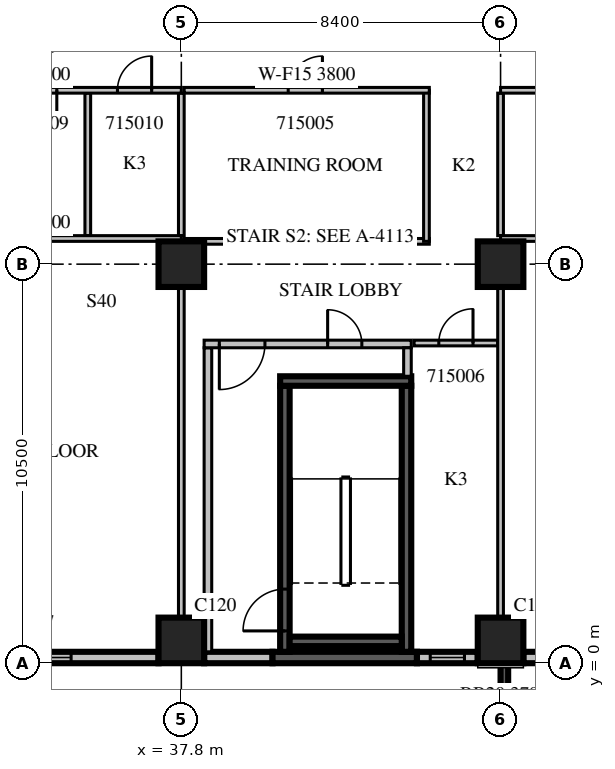
"""IFC4 building model, lengths in metres.
Left out: names, types, materials, properties, quantities, classifications, styles, units other than length and angle.
Written with IfcOpenShell. Run it as: python <this file> out.ifc"""

import sys

from ifc_helpers import new_model, si_unit, direction, frame, frame_2d, origin, origin_2d, place, context, subcontext, project, spatial, rectangle, extrude, source, transform, mapped, element, fill, save


model = new_model("IFC4")
c1 = context("Model", 3, precision=1e-05, world=origin(), true_north=direction((0.0, 1.0)))
c2 = subcontext(c1, "Body", "Model", "MODEL_VIEW")
j1 = project(units=[si_unit("LENGTHUNIT", "METRE"), si_unit("PLANEANGLEUNIT", "RADIAN")], contexts=[c1])
p1 = place(None, origin())
s1 = spatial("IfcSite", under=j1, at=p1, CompositionType="ELEMENT")
p2 = place(p1, origin())
s2 = spatial("IfcBuilding", under=s1, at=p2, CompositionType="ELEMENT")
p3 = place(p2, frame((0.0, 0.0, 74.1)))
s3 = spatial("IfcBuildingStorey", under=s2, at=p3, CompositionType="ELEMENT", Elevation=74.1)
m1 = source(origin(), c2, "Body", "SweptSolid", [
    extrude(rectangle(XDim=1.2, YDim=1.2, at=origin_2d()), origin(), (0.0, 0.0, 1.0), 4.2),
])
for number, where, z_axis, x_axis in (
    (1, (37.8, 0.6, 0.0), (0.0, 0.0, 1.0), (1.0, 0.0, 0.0)),
    (2, (46.2, 0.6, 0.0), (0.0, 0.0, 1.0), (1.0, 0.0, 0.0)),
    (3, (37.8, 10.5, 0.0), (0.0, 0.0, 1.0), (1.0, 0.0, 0.0)),
    (4, (46.2, 10.5, 0.0), (0.0, 0.0, 1.0), (1.0, 0.0, 0.0)),
):
    element("IfcColumn", number, at=place(p3, frame(where, z_axis=z_axis, x_axis=x_axis)), inside=s3, PredefinedType="COLUMN", context=c2, shape_type="MappedRepresentation", body=[
        mapped(m1, transform((0.0, 0.0, 0.0), scale=1.0)),
    ])
m2 = source(origin(), c2, "Body", "SweptSolid", [
    extrude(rectangle(XDim=7.2, YDim=0.3, at=frame_2d((3.6, 0.0))), origin(), (0.0, 0.0, 1.0), 3.8),
])
p4 = place(p3, frame((30.0, 0.15, 0.0), z_axis=(0.0, 0.0, 1.0), x_axis=(1.0, 0.0, 0.0)))
e5 = element("IfcWall", 5, at=p4, inside=s3, PredefinedType="STANDARD", context=c2, shape_type="MappedRepresentation", body=[
    mapped(m2, transform((0.0, 0.0, 0.0), scale=1.0)),
])
m3 = source(origin(), c2, "Body", "SweptSolid", [
    extrude(rectangle(XDim=2.4, YDim=2.7, at=frame_2d((1.2, 1.35))), frame((0.0, 0.16, 0.0), z_axis=(0.0, -1.0, 0.0), x_axis=(1.0, 0.0, 0.0)), (0.0, 0.0, 1.0), 0.32),
])
p5 = place(p4, frame((2.5, 0.0, 0.6)))
e6 = element("IfcOpeningElement", 6, at=p5, cuts=e5, PredefinedType="OPENING", context=c2, shape_type="MappedRepresentation", body=[
    mapped(m3, transform((0.0, 0.0, 0.0), scale=1.0)),
])
m4 = source(origin(), c2, "Body", "SweptSolid", [
    extrude(rectangle(XDim=1.8, YDim=0.3, at=frame_2d((0.9, 0.0))), origin(), (0.0, 0.0, 1.0), 3.8),
])
p6 = place(p3, frame((38.4, 0.15, 0.0), z_axis=(0.0, 0.0, 1.0), x_axis=(1.0, 0.0, 0.0)))
e7 = element("IfcWall", 7, at=p6, inside=s3, PredefinedType="STANDARD", context=c2, shape_type="MappedRepresentation", body=[
    mapped(m4, transform((0.0, 0.0, 0.0), scale=1.0)),
])
m5 = source(origin(), c2, "Body", "SweptSolid", [
    extrude(rectangle(XDim=3.8, YDim=0.3, at=frame_2d((1.9, 0.0))), origin(), (0.0, 0.0, 1.0), 3.8),
])
p7 = place(p3, frame((40.2, 0.15, 0.0), z_axis=(0.0, 0.0, 1.0), x_axis=(1.0, 0.0, 0.0)))
e8 = element("IfcWall", 8, at=p7, inside=s3, PredefinedType="SOLIDWALL", context=c2, shape_type="MappedRepresentation", body=[
    mapped(m5, transform((0.0, 0.0, 0.0), scale=1.0)),
])
m6 = source(origin(), c2, "Body", "SweptSolid", [
    extrude(rectangle(XDim=1.6, YDim=0.3, at=frame_2d((0.8, 0.0))), origin(), (0.0, 0.0, 1.0), 3.8),
])
p8 = place(p3, frame((44.0, 0.15, 0.0), z_axis=(0.0, 0.0, 1.0), x_axis=(1.0, 0.0, 0.0)))
e9 = element("IfcWall", 9, at=p8, inside=s3, PredefinedType="STANDARD", context=c2, shape_type="MappedRepresentation", body=[
    mapped(m6, transform((0.0, 0.0, 0.0), scale=1.0)),
])
m7 = source(origin(), c2, "Body", "SweptSolid", [
    extrude(rectangle(XDim=0.9, YDim=2.7, at=frame_2d((0.45, 1.35))), frame((0.0, 0.16, 0.0), z_axis=(0.0, -1.0, 0.0), x_axis=(1.0, 0.0, 0.0)), (0.0, 0.0, 1.0), 0.32),
])
p9 = place(p8, frame((0.35, 0.0, 0.6)))
e10 = element("IfcOpeningElement", 10, at=p9, cuts=e9, PredefinedType="OPENING", context=c2, shape_type="MappedRepresentation", body=[
    mapped(m7, transform((0.0, 0.0, 0.0), scale=1.0)),
])
m8 = source(origin(), c2, "Body", "SweptSolid", [
    extrude(rectangle(XDim=4.68, YDim=0.3, at=frame_2d((2.34, 0.0))), origin(), (0.0, 0.0, 1.0), 3.8),
])
p10 = place(p3, frame((46.8, 0.15, 0.0), z_axis=(0.0, 0.0, 1.0), x_axis=(1.0, 0.0, 0.0)))
e11 = element("IfcWall", 11, at=p10, inside=s3, PredefinedType="STANDARD", context=c2, shape_type="MappedRepresentation", body=[
    mapped(m8, transform((0.0, 0.0, 0.0), scale=1.0)),
])
m9 = source(origin(), c2, "Body", "SweptSolid", [
    extrude(rectangle(XDim=1.0, YDim=2.1, at=frame_2d((0.5, 1.05))), frame((0.0, 0.16, 0.0), z_axis=(0.0, -1.0, 0.0), x_axis=(1.0, 0.0, 0.0)), (0.0, 0.0, 1.0), 0.32),
])
p11 = place(p10, frame((1.84, 0.0, 0.0)))
e12 = element("IfcOpeningElement", 12, at=p11, cuts=e11, PredefinedType="OPENING", context=c2, shape_type="MappedRepresentation", body=[
    mapped(m9, transform((0.0, 0.0, 0.0), scale=1.0)),
])
m10 = source(origin(), c2, "Body", "SweptSolid", [
    extrude(rectangle(XDim=3.9, YDim=0.2, at=frame_2d((1.95, 0.0))), origin(), (0.0, 0.0, 1.0), 3.79),
])
p12 = place(p3, frame((46.3, 0.0, 0.0), z_axis=(0.0, 0.0, 1.0), x_axis=(0.0, -1.0, 0.0)))
e13 = element("IfcWall", 13, at=p12, inside=s3, PredefinedType="SOLIDWALL", context=c2, shape_type="MappedRepresentation", body=[
    mapped(m10, transform((0.0, 0.0, 0.0), scale=1.0)),
])
m11 = source(origin(), c2, "Body", "SweptSolid", [
    extrude(rectangle(XDim=2.4, YDim=2.7, at=frame_2d((1.2, 1.35))), frame((0.0, 0.11, 0.0), z_axis=(0.0, -1.0, 0.0), x_axis=(1.0, 0.0, 0.0)), (0.0, 0.0, 1.0), 0.22),
])
p13 = place(p12, frame((0.75, 0.0, 0.6)))
e14 = element("IfcOpeningElement", 14, at=p13, cuts=e13, PredefinedType="OPENING", context=c2, shape_type="MappedRepresentation", body=[
    mapped(m11, transform((0.0, 0.0, 0.0), scale=1.0)),
])
m12 = source(origin(), c2, "Body", "SweptSolid", [
    extrude(rectangle(XDim=7.0, YDim=0.25, at=frame_2d((3.5, 0.0))), origin(), (0.0, 0.0, 1.0), 3.8),
])
p14 = place(p3, frame((40.525, 0.3, 0.0), z_axis=(0.0, 0.0, 1.0), x_axis=(0.0, 1.0, 0.0)))
e15 = element("IfcWall", 15, at=p14, inside=s3, PredefinedType="SOLIDWALL", context=c2, shape_type="MappedRepresentation", body=[
    mapped(m12, transform((0.0, 0.0, 0.0), scale=1.0)),
])
m13 = source(origin(), c2, "Body", "SweptSolid", [
    extrude(rectangle(XDim=1.1, YDim=2.1, at=frame_2d((0.55, 1.05))), frame((0.0, 0.135, 0.0), z_axis=(0.0, -1.0, 0.0), x_axis=(1.0, 0.0, 0.0)), (0.0, 0.0, 1.0), 0.27),
])
p15 = place(p14, frame((0.55, 0.0, 0.0)))
e16 = element("IfcOpeningElement", 16, at=p15, cuts=e15, PredefinedType="OPENING", context=c2, shape_type="MappedRepresentation", body=[
    mapped(m13, transform((0.0, 0.0, 0.0), scale=1.0)),
])
p16 = place(p3, frame((43.725, 0.3, 0.0), z_axis=(0.0, 0.0, 1.0), x_axis=(0.0, 1.0, 0.0)))
e17 = element("IfcWall", 17, at=p16, inside=s3, PredefinedType="SOLIDWALL", context=c2, shape_type="MappedRepresentation", body=[
    mapped(m12, transform((0.0, 0.0, 0.0), scale=1.0)),
])
m14 = source(origin(), c2, "Body", "SweptSolid", [
    extrude(rectangle(XDim=3.45, YDim=0.25, at=frame_2d((1.725, 0.0))), origin(), (0.0, 0.0, 1.0), 3.8),
])
p17 = place(p3, frame((40.4, 7.425, 0.0), z_axis=(0.0, 0.0, 1.0), x_axis=(1.0, 0.0, 0.0)))
e18 = element("IfcWall", 18, at=p17, inside=s3, PredefinedType="SOLIDWALL", context=c2, shape_type="MappedRepresentation", body=[
    mapped(m14, transform((0.0, 0.0, 0.0), scale=1.0)),
])
m15 = source(origin(), c2, "Body", "SweptSolid", [
    extrude(rectangle(XDim=2.95, YDim=0.25, at=frame_2d((1.475, 0.0))), origin(), (0.0, 0.0, 1.0), 3.8),
])
p18 = place(p3, frame((40.65, 0.575, 0.0), z_axis=(0.0, 0.0, 1.0), x_axis=(1.0, 0.0, 0.0)))
e19 = element("IfcWall", 19, at=p18, inside=s3, PredefinedType="SOLIDWALL", context=c2, shape_type="MappedRepresentation", body=[
    mapped(m15, transform((0.0, 0.0, 0.0), scale=1.0)),
])
m16 = source(origin(), c2, "Body", "SweptSolid", [
    extrude(rectangle(XDim=8.0, YDim=0.2, at=frame_2d((4.0, 0.0))), origin(), (0.0, 0.0, 1.0), 3.8),
])
p19 = place(p3, frame((38.5, 0.3, 0.0), z_axis=(0.0, 0.0, 1.0), x_axis=(0.0, 1.0, 0.0)))
e20 = element("IfcWall", 20, at=p19, inside=s3, PredefinedType="PARTITIONING", context=c2, shape_type="MappedRepresentation", body=[
    mapped(m16, transform((0.0, 0.0, 0.0), scale=1.0)),
])
m17 = source(origin(), c2, "Body", "SweptSolid", [
    extrude(rectangle(XDim=5.45, YDim=0.2, at=frame_2d((2.725, 0.0))), origin(), (0.0, 0.0, 1.0), 3.8),
])
p20 = place(p3, frame((38.4, 8.4, 0.0), z_axis=(0.0, 0.0, 1.0), x_axis=(1.0, 0.0, 0.0)))
e21 = element("IfcWall", 21, at=p20, inside=s3, PredefinedType="PARTITIONING", context=c2, shape_type="MappedRepresentation", body=[
    mapped(m17, transform((0.0, 0.0, 0.0), scale=1.0)),
])
m18 = source(origin(), c2, "Body", "SweptSolid", [
    extrude(rectangle(XDim=1.2, YDim=2.1, at=frame_2d((0.6, 1.05))), frame((0.0, 0.11, 0.0), z_axis=(0.0, -1.0, 0.0), x_axis=(1.0, 0.0, 0.0)), (0.0, 0.0, 1.0), 0.22),
])
p21 = place(p20, frame((0.4, 0.0, 0.0)))
e22 = element("IfcOpeningElement", 22, at=p21, cuts=e21, PredefinedType="OPENING", context=c2, shape_type="MappedRepresentation", body=[
    mapped(m18, transform((0.0, 0.0, 0.0), scale=1.0)),
])
m19 = source(origin(), c2, "Body", "SweptSolid", [
    extrude(rectangle(XDim=0.9, YDim=2.1, at=frame_2d((0.45, 1.05))), frame((0.0, 0.11, 0.0), z_axis=(0.0, -1.0, 0.0), x_axis=(1.0, 0.0, 0.0)), (0.0, 0.0, 1.0), 0.22),
])
p22 = place(p20, frame((3.25, 0.0, 0.0)))
e23 = element("IfcOpeningElement", 23, at=p22, cuts=e21, PredefinedType="OPENING", context=c2, shape_type="MappedRepresentation", body=[
    mapped(m19, transform((0.0, 0.0, 0.0), scale=1.0)),
])
m20 = source(origin(), c2, "Body", "SweptSolid", [
    extrude(rectangle(XDim=0.75, YDim=0.2, at=frame_2d((0.375, 0.0))), origin(), (0.0, 0.0, 1.0), 3.8),
])
p23 = place(p3, frame((43.75, 7.55, 0.0), z_axis=(0.0, 0.0, 1.0), x_axis=(0.0, 1.0, 0.0)))
e24 = element("IfcWall", 24, at=p23, inside=s3, PredefinedType="PARTITIONING", context=c2, shape_type="MappedRepresentation", body=[
    mapped(m20, transform((0.0, 0.0, 0.0), scale=1.0)),
])
m21 = source(origin(), c2, "Body", "SweptSolid", [
    extrude(rectangle(XDim=6.45, YDim=0.15, at=frame_2d((3.225, 0.0))), origin(), (0.0, 0.0, 1.0), 3.8),
])
p24 = place(p3, frame((37.875, 11.1, 0.0), z_axis=(0.0, 0.0, 1.0), x_axis=(1.0, 0.0, 0.0)))
e25 = element("IfcWall", 25, at=p24, inside=s3, PredefinedType="PARTITIONING", context=c2, shape_type="MappedRepresentation", body=[
    mapped(m21, transform((0.0, 0.0, 0.0), scale=1.0)),
])
m22 = source(origin(), c2, "Body", "SweptSolid", [
    extrude(rectangle(XDim=3.975, YDim=0.15, at=frame_2d((1.988, 0.0))), origin(), (0.0, 0.0, 1.0), 3.8),
])
p25 = place(p3, frame((44.25, 11.1, 0.0), z_axis=(0.0, 0.0, 1.0), x_axis=(0.0, 1.0, 0.0)))
e26 = element("IfcWall", 26, at=p25, inside=s3, PredefinedType="PARTITIONING", context=c2, shape_type="MappedRepresentation", body=[
    mapped(m22, transform((0.0, 0.0, 0.0), scale=1.0)),
])
p26 = place(p3, frame((44.325, 15.075, 0.0), z_axis=(0.0, 0.0, 1.0), x_axis=(-1.0, 0.0, 0.0)))
e27 = element("IfcWall", 27, at=p26, inside=s3, PredefinedType="PARTITIONING", context=c2, shape_type="MappedRepresentation", body=[
    mapped(m21, transform((0.0, 0.0, 0.0), scale=1.0)),
])
m23 = source(origin(), c2, "Body", "SweptSolid", [
    extrude(rectangle(XDim=0.9, YDim=2.1, at=frame_2d((0.45, 1.05))), frame((0.0, 0.085, 0.0), z_axis=(0.0, -1.0, 0.0), x_axis=(1.0, 0.0, 0.0)), (0.0, 0.0, 1.0), 0.17),
])
p27 = place(p26, frame((2.812, 0.0, 0.0)))
e28 = element("IfcOpeningElement", 28, at=p27, cuts=e27, PredefinedType="OPENING", context=c2, shape_type="MappedRepresentation", body=[
    mapped(m23, transform((0.0, 0.0, 0.0), scale=1.0)),
])
m24 = source(origin(), c2, "Body", "SweptSolid", [
    extrude(rectangle(XDim=2.2, YDim=0.15, at=frame_2d((1.1, 0.0))), origin(), (0.0, 0.0, 1.0), 3.8),
])
p28 = place(p3, frame((46.125, 8.425, 0.0), z_axis=(0.0, 0.0, 1.0), x_axis=(-1.0, 0.0, 0.0)))
e29 = element("IfcWall", 29, at=p28, inside=s3, PredefinedType="PARTITIONING", context=c2, shape_type="MappedRepresentation", body=[
    mapped(m24, transform((0.0, 0.0, 0.0), scale=1.0)),
])
p29 = place(p28, frame((0.65, 0.0, 0.0)))
e30 = element("IfcOpeningElement", 30, at=p29, cuts=e29, PredefinedType="OPENING", context=c2, shape_type="MappedRepresentation", body=[
    mapped(m23, transform((0.0, 0.0, 0.0), scale=1.0)),
])
m25 = source(origin(), c2, "Body", "SweptSolid", [
    extrude(rectangle(XDim=3.75, YDim=0.15, at=frame_2d((1.875, 0.0))), origin(), (0.0, 0.0, 1.0), 3.8),
])
p30 = place(p3, frame((35.339, 11.25, 0.0), z_axis=(0.0, 0.0, 1.0), x_axis=(0.0, 1.0, 0.0)))
e31 = element("IfcWall", 31, at=p30, inside=s3, PredefinedType="PARTITIONING", context=c2, shape_type="MappedRepresentation", body=[
    mapped(m25, transform((0.0, 0.0, 0.0), scale=1.0)),
])
m26 = source(origin(), c2, "Body", "SweptSolid", [
    extrude(rectangle(XDim=8.702, YDim=0.15, at=frame_2d((4.351, 0.0))), origin(), (0.0, 0.0, 1.0), 3.8),
])
p31 = place(p3, frame((37.8, 1.199, 0.0), z_axis=(0.0, 0.0, 1.0), x_axis=(0.0, 1.0, 0.0)))
e32 = element("IfcWall", 32, at=p31, inside=s3, PredefinedType="PARTITIONING", context=c2, shape_type="MappedRepresentation", body=[
    mapped(m26, transform((0.0, 0.0, 0.0), scale=1.0)),
])
p32 = place(p3, frame((37.8, 11.25, 0.0), z_axis=(0.0, 0.0, 1.0), x_axis=(0.0, 1.0, 0.0)))
e33 = element("IfcWall", 33, at=p32, inside=s3, PredefinedType="PARTITIONING", context=c2, shape_type="MappedRepresentation", body=[
    mapped(m25, transform((0.0, 0.0, 0.0), scale=1.0)),
])
m27 = source(origin(), c2, "Body", "SweptSolid", [
    extrude(rectangle(XDim=8.4, YDim=0.15, at=frame_2d((4.2, 0.0))), origin(), (0.0, 0.0, 1.0), 3.3),
])
p33 = place(p3, frame((37.8, 11.175, 0.0), z_axis=(0.0, 0.0, 1.0), x_axis=(-1.0, 0.0, 0.0)))
e34 = element("IfcWall", 34, at=p33, inside=s3, PredefinedType="PARTITIONING", context=c2, shape_type="MappedRepresentation", body=[
    mapped(m27, transform((0.0, 0.0, 0.0), scale=1.0)),
])
m28 = source(origin(), c2, "Body", "SweptSolid", [
    extrude(rectangle(XDim=1.1, YDim=2.1, at=frame_2d((0.55, 1.05))), frame((0.0, 0.085, 0.0), z_axis=(0.0, -1.0, 0.0), x_axis=(1.0, 0.0, 0.0)), (0.0, 0.0, 1.0), 0.17),
])
p34 = place(p33, frame((5.833, 0.0, 0.0)))
e35 = element("IfcOpeningElement", 35, at=p34, cuts=e34, PredefinedType="OPENING", context=c2, shape_type="MappedRepresentation", body=[
    mapped(m28, transform((0.0, 0.0, 0.0), scale=1.0)),
])
p35 = place(p3, frame((46.2, 1.199, 0.0), z_axis=(0.0, 0.0, 1.0), x_axis=(0.0, 1.0, 0.0)))
e36 = element("IfcWall", 36, at=p35, inside=s3, PredefinedType="PARTITIONING", context=c2, shape_type="MappedRepresentation", body=[
    mapped(m26, transform((0.0, 0.0, 0.0), scale=1.0)),
])
p36 = place(p3, frame((46.2, 11.25, 0.0), z_axis=(0.0, 0.0, 1.0), x_axis=(0.0, 1.0, 0.0)))
e37 = element("IfcWall", 37, at=p36, inside=s3, PredefinedType="PARTITIONING", context=c2, shape_type="MappedRepresentation", body=[
    mapped(m25, transform((0.0, 0.0, 0.0), scale=1.0)),
])
m29 = source(origin(), c2, "Body", "SweptSolid", [
    extrude(rectangle(XDim=24.9, YDim=0.15, at=frame_2d((12.45, 0.0))), origin(), (0.0, 0.0, 1.0), 3.8),
])
p37 = place(p3, frame((71.1, 11.175, 0.0), z_axis=(0.0, 0.0, 1.0), x_axis=(-1.0, 0.0, 0.0)))
e38 = element("IfcWall", 38, at=p37, inside=s3, PredefinedType="PARTITIONING", context=c2, shape_type="MappedRepresentation", body=[
    mapped(m29, transform((0.0, 0.0, 0.0), scale=1.0)),
])
p38 = place(p37, frame((22.332, 0.0, 0.0)))
e39 = element("IfcOpeningElement", 39, at=p38, cuts=e38, PredefinedType="OPENING", context=c2, shape_type="MappedRepresentation", body=[
    mapped(m28, transform((0.0, 0.0, 0.0), scale=1.0)),
])
p39 = place(p37, frame((4.607, 0.0, 0.0)))
e40 = element("IfcOpeningElement", 40, at=p39, cuts=e38, PredefinedType="OPENING", context=c2, shape_type="MappedRepresentation", body=[
    mapped(m23, transform((0.0, 0.0, 0.0), scale=1.0)),
])
p40 = place(p37, frame((2.243, 0.0, 0.0)))
e41 = element("IfcOpeningElement", 41, at=p40, cuts=e38, PredefinedType="OPENING", context=c2, shape_type="MappedRepresentation", body=[
    mapped(m23, transform((0.0, 0.0, 0.0), scale=1.0)),
])
p41 = place(p3, frame((37.8, 15.075, 0.0), z_axis=(0.0, 0.0, 1.0), x_axis=(-1.0, 0.0, 0.0)))
e42 = element("IfcWall", 42, at=p41, inside=s3, PredefinedType="PARTITIONING", context=c2, shape_type="MappedRepresentation", body=[
    mapped(m27, transform((0.0, 0.0, 0.0), scale=1.0)),
])
p42 = place(p41, frame((6.146, 0.0, 0.0)))
e43 = element("IfcOpeningElement", 43, at=p42, cuts=e42, PredefinedType="OPENING", context=c2, shape_type="MappedRepresentation", body=[
    mapped(m28, transform((0.0, 0.0, 0.0), scale=1.0)),
])
p43 = place(p41, frame((3.276, 0.0, 0.0)))
e44 = element("IfcOpeningElement", 44, at=p43, cuts=e42, PredefinedType="OPENING", context=c2, shape_type="MappedRepresentation", body=[
    mapped(m23, transform((0.0, 0.0, 0.0), scale=1.0)),
])
p44 = place(p41, frame((0.781, 0.0, 0.0)))
e45 = element("IfcOpeningElement", 45, at=p44, cuts=e42, PredefinedType="OPENING", context=c2, shape_type="MappedRepresentation", body=[
    mapped(m23, transform((0.0, 0.0, 0.0), scale=1.0)),
])
p45 = place(p3, frame((71.1, 15.075, 0.0), z_axis=(0.0, 0.0, 1.0), x_axis=(-1.0, 0.0, 0.0)))
e46 = element("IfcWall", 46, at=p45, inside=s3, PredefinedType="PARTITIONING", context=c2, shape_type="MappedRepresentation", body=[
    mapped(m29, transform((0.0, 0.0, 0.0), scale=1.0)),
])
p46 = place(p45, frame((22.644, 0.0, 0.0)))
e47 = element("IfcOpeningElement", 47, at=p46, cuts=e46, PredefinedType="OPENING", context=c2, shape_type="MappedRepresentation", body=[
    mapped(m28, transform((0.0, 0.0, 0.0), scale=1.0)),
])
p47 = place(p45, frame((19.804, 0.0, 0.0)))
e48 = element("IfcOpeningElement", 48, at=p47, cuts=e46, PredefinedType="OPENING", context=c2, shape_type="MappedRepresentation", body=[
    mapped(m23, transform((0.0, 0.0, 0.0), scale=1.0)),
])
p48 = place(p45, frame((15.529, 0.0, 0.0)))
e49 = element("IfcOpeningElement", 49, at=p48, cuts=e46, PredefinedType="OPENING", context=c2, shape_type="MappedRepresentation", body=[
    mapped(m23, transform((0.0, 0.0, 0.0), scale=1.0)),
])
p49 = place(p45, frame((10.838, 0.0, 0.0)))
e50 = element("IfcOpeningElement", 50, at=p49, cuts=e46, PredefinedType="OPENING", context=c2, shape_type="MappedRepresentation", body=[
    mapped(m23, transform((0.0, 0.0, 0.0), scale=1.0)),
])
p50 = place(p45, frame((7.999, 0.0, 0.0)))
e51 = element("IfcOpeningElement", 51, at=p50, cuts=e46, PredefinedType="OPENING", context=c2, shape_type="MappedRepresentation", body=[
    mapped(m23, transform((0.0, 0.0, 0.0), scale=1.0)),
])
m30 = source(origin(), c2, "Body", "SweptSolid", [
    extrude(rectangle(XDim=1.2, YDim=2.1, at=frame_2d((0.6, 1.05))), frame((0.0, 0.085, 0.0), z_axis=(0.0, -1.0, 0.0), x_axis=(1.0, 0.0, 0.0)), (0.0, 0.0, 1.0), 0.17),
])
p51 = place(p45, frame((2.993, 0.0, 0.0)))
e52 = element("IfcOpeningElement", 52, at=p51, cuts=e46, PredefinedType="OPENING", context=c2, shape_type="MappedRepresentation", body=[
    mapped(m30, transform((0.0, 0.0, 0.0), scale=1.0)),
])
m31 = source(origin(), c2, "Body", "SweptSolid", [
    extrude(rectangle(XDim=2.4, YDim=2.7, at=frame_2d((1.2, 1.35))), frame((0.0, 0.03, 0.0), z_axis=(0.0, -1.0, 0.0), x_axis=(1.0, 0.0, 0.0)), (0.0, 0.0, 1.0), 0.06),
])
p52 = place(p5, origin())
e53 = element("IfcWindow", 53, at=p52, inside=s3, PartitioningType="SINGLE_PANEL", PredefinedType="WINDOW", context=c2, shape_type="MappedRepresentation", body=[
    mapped(m31, transform((0.0, 0.0, 0.0), scale=1.0)),
])
fill(e6, e53)
m32 = source(origin(), c2, "Body", "SweptSolid", [
    extrude(rectangle(XDim=0.9, YDim=2.7, at=frame_2d((0.45, 1.35))), frame((0.0, 0.03, 0.0), z_axis=(0.0, -1.0, 0.0), x_axis=(1.0, 0.0, 0.0)), (0.0, 0.0, 1.0), 0.06),
])
p53 = place(p9, origin())
e54 = element("IfcWindow", 54, at=p53, inside=s3, PartitioningType="SINGLE_PANEL", PredefinedType="WINDOW", context=c2, shape_type="MappedRepresentation", body=[
    mapped(m32, transform((0.0, 0.0, 0.0), scale=1.0)),
])
fill(e10, e54)
m33 = source(origin(), c2, "Body", "SweptSolid", [
    extrude(rectangle(XDim=1.1, YDim=2.1, at=frame_2d((0.55, 1.05))), frame((0.0, 0.025, 0.0), z_axis=(0.0, -1.0, 0.0), x_axis=(1.0, 0.0, 0.0)), (0.0, 0.0, 1.0), 0.05),
])
p54 = place(p15, origin())
e55 = element("IfcDoor", 55, at=p54, inside=s3, OperationType="SINGLE_SWING_LEFT", PredefinedType="DOOR", context=c2, shape_type="MappedRepresentation", body=[
    mapped(m33, transform((0.0, 0.0, 0.0), scale=1.0)),
])
fill(e16, e55)
m34 = source(origin(), c2, "Body", "SweptSolid", [
    extrude(rectangle(XDim=1.2, YDim=2.1, at=frame_2d((0.6, 1.05))), frame((0.0, 0.025, 0.0), z_axis=(0.0, -1.0, 0.0), x_axis=(1.0, 0.0, 0.0)), (0.0, 0.0, 1.0), 0.05),
])
p55 = place(p21, origin())
e56 = element("IfcDoor", 56, at=p55, inside=s3, OperationType="SINGLE_SWING_RIGHT", PredefinedType="DOOR", context=c2, shape_type="MappedRepresentation", body=[
    mapped(m34, transform((0.0, 0.0, 0.0), scale=1.0)),
])
fill(e22, e56)
m35 = source(origin(), c2, "Body", "SweptSolid", [
    extrude(rectangle(XDim=0.9, YDim=2.1, at=frame_2d((0.45, 1.05))), frame((0.0, 0.025, 0.0), z_axis=(0.0, -1.0, 0.0), x_axis=(1.0, 0.0, 0.0)), (0.0, 0.0, 1.0), 0.05),
])
p56 = place(p22, origin())
e57 = element("IfcDoor", 57, at=p56, inside=s3, OperationType="SINGLE_SWING_LEFT", PredefinedType="DOOR", context=c2, shape_type="MappedRepresentation", body=[
    mapped(m35, transform((0.0, 0.0, 0.0), scale=1.0)),
])
fill(e23, e57)
p57 = place(p27, origin())
e58 = element("IfcDoor", 58, at=p57, inside=s3, OperationType="SINGLE_SWING_RIGHT", PredefinedType="DOOR", context=c2, shape_type="MappedRepresentation", body=[
    mapped(m35, transform((0.0, 0.0, 0.0), scale=1.0)),
])
fill(e28, e58)
p58 = place(p29, origin())
e59 = element("IfcDoor", 59, at=p58, inside=s3, OperationType="SINGLE_SWING_RIGHT", PredefinedType="DOOR", context=c2, shape_type="MappedRepresentation", body=[
    mapped(m35, transform((0.0, 0.0, 0.0), scale=1.0)),
])
fill(e30, e59)
p59 = place(p43, origin())
e60 = element("IfcDoor", 60, at=p59, inside=s3, OperationType="SINGLE_SWING_LEFT", PredefinedType="DOOR", context=c2, shape_type="MappedRepresentation", body=[
    mapped(m35, transform((0.0, 0.0, 0.0), scale=1.0)),
])
fill(e44, e60)
p60 = place(p44, origin())
e61 = element("IfcDoor", 61, at=p60, inside=s3, OperationType="SINGLE_SWING_RIGHT", PredefinedType="DOOR", context=c2, shape_type="MappedRepresentation", body=[
    mapped(m35, transform((0.0, 0.0, 0.0), scale=1.0)),
])
fill(e45, e61)
save(model, sys.argv[1])
